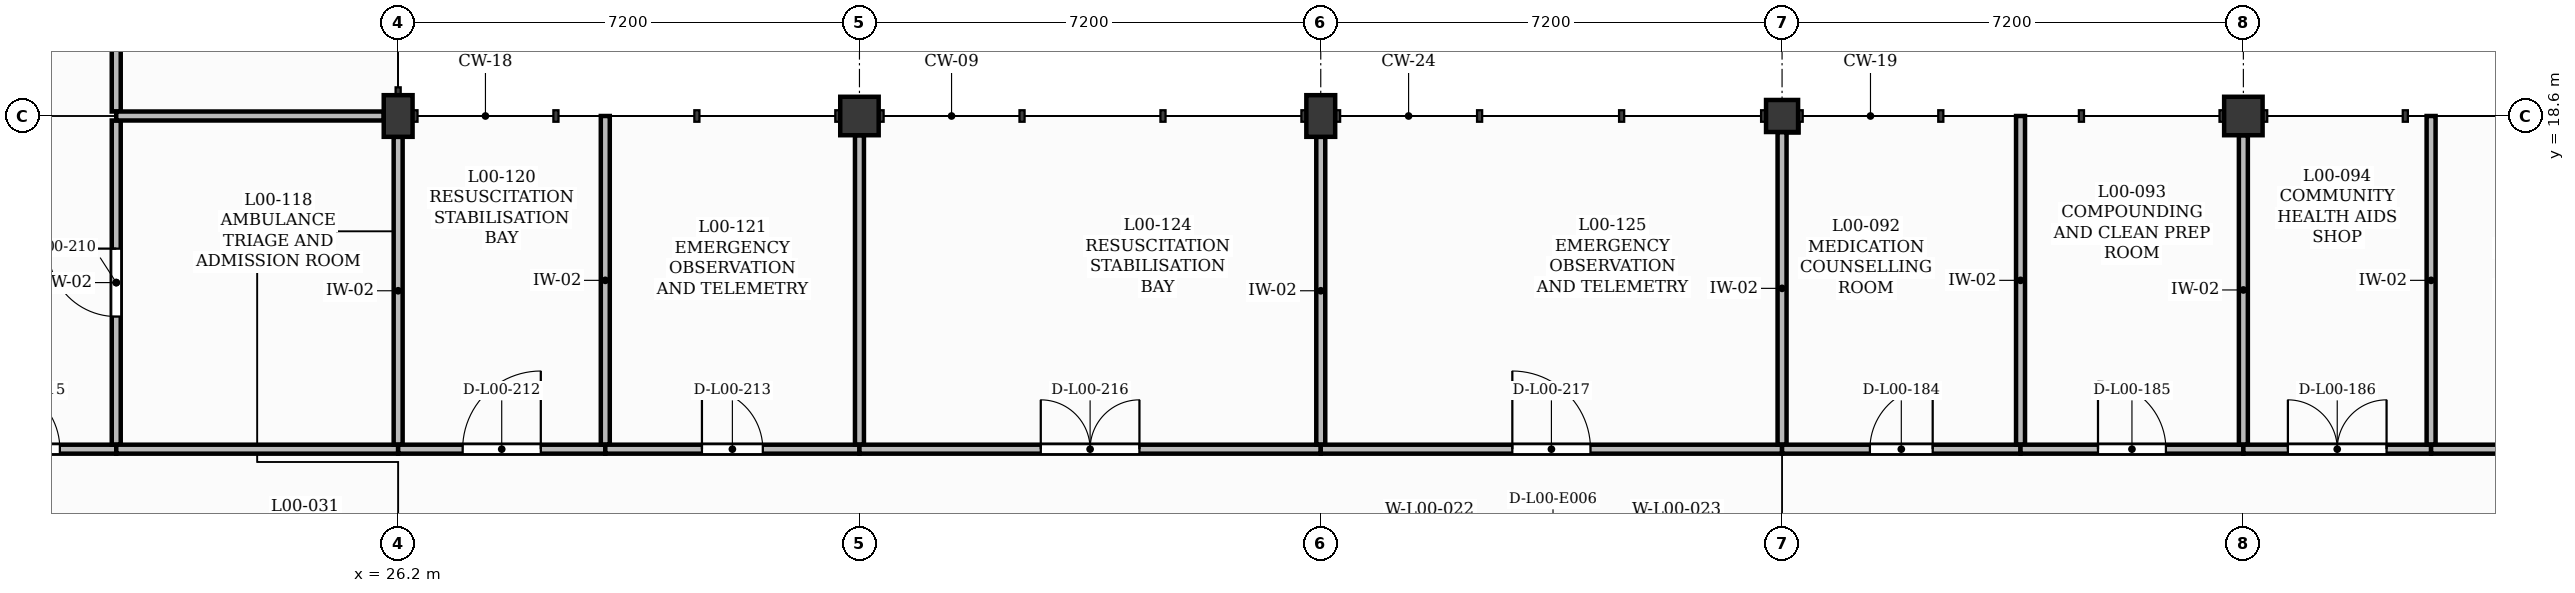
"""IFC4 building model, lengths in metres.
Left out: names, types, materials, properties, quantities, classifications, styles, units other than length and angle.
Written with IfcOpenShell. Run it as: python <this file> out.ifc"""

import sys

from ifc_helpers import new_model, si_unit, direction, frame, frame_2d, origin, origin_2d, place, context, subcontext, project, spatial, rectangle, extrude, element, fill, save


model = new_model("IFC4")
c1 = context("Model", 3, precision=1e-05, world=origin(), true_north=direction((0.0, 1.0)))
c2 = subcontext(c1, "Body", "Model", "MODEL_VIEW")
j1 = project(units=[si_unit("LENGTHUNIT", "METRE"), si_unit("PLANEANGLEUNIT", "RADIAN")], contexts=[c1])
p1 = place(None, origin())
s1 = spatial("IfcSite", under=j1, at=p1, CompositionType="ELEMENT")
p2 = place(p1, origin())
s2 = spatial("IfcBuilding", under=s1, at=p2, CompositionType="ELEMENT")
p3 = place(p2, origin())
s3 = spatial("IfcBuildingStorey", under=s2, at=p3, CompositionType="ELEMENT", Elevation=0.0)
p4 = place(p3, frame((26.2, 18.6, 0.0), z_axis=(0.0, 0.0, 1.0), x_axis=(1.0, 0.0, 0.0)))
e1 = element("IfcColumn", 1, at=p4, inside=s3, PredefinedType="COLUMN", context=c2, shape_type="SweptSolid", body=[
    extrude(rectangle(XDim=0.45, YDim=0.65, at=origin_2d()), origin(), (0.0, 0.0, 1.0), 4.2),
])
p5 = place(p3, frame((33.4, 18.6, 0.0), z_axis=(0.0, 0.0, 1.0), x_axis=(1.0, 0.0, 0.0)))
e2 = element("IfcColumn", 2, at=p5, inside=s3, PredefinedType="COLUMN", context=c2, shape_type="SweptSolid", body=[
    extrude(rectangle(XDim=0.6, YDim=0.6, at=origin_2d()), origin(), (0.0, 0.0, 1.0), 4.2),
])
p6 = place(p3, frame((40.6, 18.6, 0.0), z_axis=(0.0, 0.0, 1.0), x_axis=(1.0, 0.0, 0.0)))
e3 = element("IfcColumn", 3, at=p6, inside=s3, PredefinedType="COLUMN", context=c2, shape_type="SweptSolid", body=[
    extrude(rectangle(XDim=0.45, YDim=0.65, at=origin_2d()), origin(), (0.0, 0.0, 1.0), 4.2),
])
p7 = place(p3, frame((47.8, 18.6, 0.0), z_axis=(0.0, 0.0, 1.0), x_axis=(1.0, 0.0, 0.0)))
e4 = element("IfcColumn", 4, at=p7, inside=s3, PredefinedType="COLUMN", context=c2, shape_type="SweptSolid", body=[
    extrude(rectangle(XDim=0.5, YDim=0.5, at=origin_2d()), origin(), (0.0, 0.0, 1.0), 4.2),
])
p8 = place(p3, frame((55.0, 18.6, 0.0), z_axis=(0.0, 0.0, 1.0), x_axis=(1.0, 0.0, 0.0)))
e5 = element("IfcColumn", 5, at=p8, inside=s3, PredefinedType="COLUMN", context=c2, shape_type="SweptSolid", body=[
    extrude(rectangle(XDim=0.6, YDim=0.6, at=origin_2d()), origin(), (0.0, 0.0, 1.0), 4.2),
])
p9 = place(p3, frame((19.0, 13.4, 0.0), z_axis=(0.0, 0.0, 1.0), x_axis=(1.0, 0.0, 0.0)))
e6 = element("IfcWall", 6, at=p9, inside=s3, PredefinedType="PARTITIONING", context=c2, shape_type="SweptSolid", body=[
    extrude(rectangle(XDim=2.8, YDim=0.14, at=frame_2d((1.4, 0.0))), origin(), (0.0, 0.0, 1.0), 4.18),
])
p10 = place(p9, frame((0.88, 0.0, 0.0)))
e7 = element("IfcOpeningElement", 7, at=p10, cuts=e6, PredefinedType="OPENING", context=c2, shape_type="SweptSolid", body=[
    extrude(rectangle(XDim=1.04, YDim=2.1, at=frame_2d((0.52, 1.05))), frame((0.0, 0.08, 0.0), z_axis=(0.0, -1.0, 0.0), x_axis=(1.0, 0.0, 0.0)), (0.0, 0.0, 1.0), 0.16),
])
p11 = place(p3, frame((21.8, 13.47, 0.0), z_axis=(0.0, 0.0, 1.0), x_axis=(0.0, 1.0, 0.0)))
e8 = element("IfcWall", 8, at=p11, inside=s3, PredefinedType="PARTITIONING", context=c2, shape_type="SweptSolid", body=[
    extrude(rectangle(XDim=5.06, YDim=0.14, at=frame_2d((2.53, 0.0))), origin(), (0.0, 0.0, 1.0), 4.18),
])
p12 = place(p11, frame((2.0, 0.0, 0.0)))
e9 = element("IfcOpeningElement", 9, at=p12, cuts=e8, PredefinedType="OPENING", context=c2, shape_type="SweptSolid", body=[
    extrude(rectangle(XDim=1.06, YDim=2.15, at=frame_2d((0.53, 1.075))), frame((0.0, 0.08, 0.0), z_axis=(0.0, -1.0, 0.0), x_axis=(1.0, 0.0, 0.0)), (0.0, 0.0, 1.0), 0.16),
])
p13 = place(p3, frame((21.8, 13.4, 0.0), z_axis=(0.0, 0.0, 1.0), x_axis=(1.0, 0.0, 0.0)))
e10 = element("IfcWall", 10, at=p13, inside=s3, PredefinedType="PARTITIONING", context=c2, shape_type="SweptSolid", body=[
    extrude(rectangle(XDim=4.4, YDim=0.14, at=frame_2d((2.2, 0.0))), origin(), (0.0, 0.0, 1.0), 4.18),
])
p14 = place(p3, frame((21.8, 18.67, 0.0), z_axis=(0.0, 0.0, 1.0), x_axis=(0.0, 1.0, 0.0)))
e11 = element("IfcWall", 11, at=p14, inside=s3, PredefinedType="PARTITIONING", context=c2, shape_type="SweptSolid", body=[
    extrude(rectangle(XDim=8.46, YDim=0.14, at=frame_2d((4.23, 0.0))), origin(), (0.0, 0.0, 1.0), 4.18),
])
p15 = place(p14, frame((3.46, 0.0, 0.0)))
e12 = element("IfcOpeningElement", 12, at=p15, cuts=e11, PredefinedType="OPENING", context=c2, shape_type="SweptSolid", body=[
    extrude(rectangle(XDim=1.54, YDim=2.25, at=frame_2d((0.77, 1.125))), frame((0.0, 0.08, 0.0), z_axis=(0.0, -1.0, 0.0), x_axis=(1.0, 0.0, 0.0)), (0.0, 0.0, 1.0), 0.16),
])
p16 = place(p3, frame((21.8, 18.6, 0.0), z_axis=(0.0, 0.0, 1.0), x_axis=(1.0, 0.0, 0.0)))
e13 = element("IfcWall", 13, at=p16, inside=s3, PredefinedType="PARTITIONING", context=c2, shape_type="SweptSolid", body=[
    extrude(rectangle(XDim=4.175, YDim=0.14, at=frame_2d((2.087, 0.0))), origin(), (0.0, 0.0, 1.0), 3.25),
])
p17 = place(p3, frame((26.2, 13.47, 0.0), z_axis=(0.0, 0.0, 1.0), x_axis=(0.0, 1.0, 0.0)))
e14 = element("IfcWall", 14, at=p17, inside=s3, PredefinedType="PARTITIONING", context=c2, shape_type="SweptSolid", body=[
    extrude(rectangle(XDim=4.805, YDim=0.14, at=frame_2d((2.402, 0.0))), origin(), (0.0, 0.0, 1.0), 3.5),
])
p18 = place(p3, frame((26.2, 13.4, 0.0), z_axis=(0.0, 0.0, 1.0), x_axis=(1.0, 0.0, 0.0)))
e15 = element("IfcWall", 15, at=p18, inside=s3, PredefinedType="PARTITIONING", context=c2, shape_type="SweptSolid", body=[
    extrude(rectangle(XDim=3.233, YDim=0.14, at=frame_2d((1.617, 0.0))), origin(), (0.0, 0.0, 1.0), 4.18),
])
p19 = place(p18, frame((1.007, 0.0, 0.0)))
e16 = element("IfcOpeningElement", 16, at=p19, cuts=e15, PredefinedType="OPENING", context=c2, shape_type="SweptSolid", body=[
    extrude(rectangle(XDim=1.22, YDim=2.1, at=frame_2d((0.61, 1.05))), frame((0.0, 0.08, 0.0), z_axis=(0.0, -1.0, 0.0), x_axis=(1.0, 0.0, 0.0)), (0.0, 0.0, 1.0), 0.16),
])
p20 = place(p3, frame((29.433, 13.47, 0.0), z_axis=(0.0, 0.0, 1.0), x_axis=(0.0, 1.0, 0.0)))
e17 = element("IfcWall", 17, at=p20, inside=s3, PredefinedType="PARTITIONING", context=c2, shape_type="SweptSolid", body=[
    extrude(rectangle(XDim=5.13, YDim=0.14, at=frame_2d((2.565, 0.0))), origin(), (0.0, 0.0, 1.0), 4.18),
])
p21 = place(p3, frame((29.433, 13.4, 0.0), z_axis=(0.0, 0.0, 1.0), x_axis=(1.0, 0.0, 0.0)))
e18 = element("IfcWall", 18, at=p21, inside=s3, PredefinedType="PARTITIONING", context=c2, shape_type="SweptSolid", body=[
    extrude(rectangle(XDim=3.967, YDim=0.14, at=frame_2d((1.983, 0.0))), origin(), (0.0, 0.0, 1.0), 4.18),
])
p22 = place(p21, frame((1.509, 0.0, 0.0)))
e19 = element("IfcOpeningElement", 19, at=p22, cuts=e18, PredefinedType="OPENING", context=c2, shape_type="SweptSolid", body=[
    extrude(rectangle(XDim=0.95, YDim=2.1, at=frame_2d((0.475, 1.05))), frame((0.0, 0.08, 0.0), z_axis=(0.0, -1.0, 0.0), x_axis=(1.0, 0.0, 0.0)), (0.0, 0.0, 1.0), 0.16),
])
p23 = place(p3, frame((33.4, 13.47, 0.0), z_axis=(0.0, 0.0, 1.0), x_axis=(0.0, 1.0, 0.0)))
e20 = element("IfcWall", 20, at=p23, inside=s3, PredefinedType="PARTITIONING", context=c2, shape_type="SweptSolid", body=[
    extrude(rectangle(XDim=4.83, YDim=0.14, at=frame_2d((2.415, 0.0))), origin(), (0.0, 0.0, 1.0), 3.5),
])
p24 = place(p3, frame((33.4, 13.4, 0.0), z_axis=(0.0, 0.0, 1.0), x_axis=(1.0, 0.0, 0.0)))
e21 = element("IfcWall", 21, at=p24, inside=s3, PredefinedType="PARTITIONING", context=c2, shape_type="SweptSolid", body=[
    extrude(rectangle(XDim=7.2, YDim=0.14, at=frame_2d((3.6, 0.0))), origin(), (0.0, 0.0, 1.0), 4.18),
])
p25 = place(p24, frame((2.83, 0.0, 0.0)))
e22 = element("IfcOpeningElement", 22, at=p25, cuts=e21, PredefinedType="OPENING", context=c2, shape_type="SweptSolid", body=[
    extrude(rectangle(XDim=1.54, YDim=2.25, at=frame_2d((0.77, 1.125))), frame((0.0, 0.08, 0.0), z_axis=(0.0, -1.0, 0.0), x_axis=(1.0, 0.0, 0.0)), (0.0, 0.0, 1.0), 0.16),
])
p26 = place(p3, frame((40.6, 13.47, 0.0), z_axis=(0.0, 0.0, 1.0), x_axis=(0.0, 1.0, 0.0)))
e23 = element("IfcWall", 23, at=p26, inside=s3, PredefinedType="PARTITIONING", context=c2, shape_type="SweptSolid", body=[
    extrude(rectangle(XDim=4.805, YDim=0.14, at=frame_2d((2.402, 0.0))), origin(), (0.0, 0.0, 1.0), 3.5),
])
p27 = place(p3, frame((40.6, 13.4, 0.0), z_axis=(0.0, 0.0, 1.0), x_axis=(1.0, 0.0, 0.0)))
e24 = element("IfcWall", 24, at=p27, inside=s3, PredefinedType="PARTITIONING", context=c2, shape_type="SweptSolid", body=[
    extrude(rectangle(XDim=7.2, YDim=0.14, at=frame_2d((3.6, 0.0))), origin(), (0.0, 0.0, 1.0), 4.18),
])
p28 = place(p27, frame((2.99, 0.0, 0.0)))
e25 = element("IfcOpeningElement", 25, at=p28, cuts=e24, PredefinedType="OPENING", context=c2, shape_type="SweptSolid", body=[
    extrude(rectangle(XDim=1.22, YDim=2.1, at=frame_2d((0.61, 1.05))), frame((0.0, 0.08, 0.0), z_axis=(0.0, -1.0, 0.0), x_axis=(1.0, 0.0, 0.0)), (0.0, 0.0, 1.0), 0.16),
])
p29 = place(p3, frame((47.8, 13.47, 0.0), z_axis=(0.0, 0.0, 1.0), x_axis=(0.0, 1.0, 0.0)))
e26 = element("IfcWall", 26, at=p29, inside=s3, PredefinedType="PARTITIONING", context=c2, shape_type="SweptSolid", body=[
    extrude(rectangle(XDim=4.88, YDim=0.14, at=frame_2d((2.44, 0.0))), origin(), (0.0, 0.0, 1.0), 3.5),
])
p30 = place(p3, frame((47.8, 13.4, 0.0), z_axis=(0.0, 0.0, 1.0), x_axis=(1.0, 0.0, 0.0)))
e27 = element("IfcWall", 27, at=p30, inside=s3, PredefinedType="PARTITIONING", context=c2, shape_type="SweptSolid", body=[
    extrude(rectangle(XDim=3.722, YDim=0.14, at=frame_2d((1.861, 0.0))), origin(), (0.0, 0.0, 1.0), 4.18),
])
p31 = place(p30, frame((1.371, 0.0, 0.0)))
e28 = element("IfcOpeningElement", 28, at=p31, cuts=e27, PredefinedType="OPENING", context=c2, shape_type="SweptSolid", body=[
    extrude(rectangle(XDim=0.98, YDim=2.15, at=frame_2d((0.49, 1.075))), frame((0.0, 0.08, 0.0), z_axis=(0.0, -1.0, 0.0), x_axis=(1.0, 0.0, 0.0)), (0.0, 0.0, 1.0), 0.16),
])
p32 = place(p3, frame((51.522, 13.47, 0.0), z_axis=(0.0, 0.0, 1.0), x_axis=(0.0, 1.0, 0.0)))
e29 = element("IfcWall", 29, at=p32, inside=s3, PredefinedType="PARTITIONING", context=c2, shape_type="SweptSolid", body=[
    extrude(rectangle(XDim=5.13, YDim=0.14, at=frame_2d((2.565, 0.0))), origin(), (0.0, 0.0, 1.0), 4.18),
])
p33 = place(p3, frame((51.522, 13.4, 0.0), z_axis=(0.0, 0.0, 1.0), x_axis=(1.0, 0.0, 0.0)))
e30 = element("IfcWall", 30, at=p33, inside=s3, PredefinedType="PARTITIONING", context=c2, shape_type="SweptSolid", body=[
    extrude(rectangle(XDim=3.478, YDim=0.14, at=frame_2d((1.739, 0.0))), origin(), (0.0, 0.0, 1.0), 4.18),
])
p34 = place(p33, frame((1.209, 0.0, 0.0)))
e31 = element("IfcOpeningElement", 31, at=p34, cuts=e30, PredefinedType="OPENING", context=c2, shape_type="SweptSolid", body=[
    extrude(rectangle(XDim=1.06, YDim=2.15, at=frame_2d((0.53, 1.075))), frame((0.0, 0.08, 0.0), z_axis=(0.0, -1.0, 0.0), x_axis=(1.0, 0.0, 0.0)), (0.0, 0.0, 1.0), 0.16),
])
p35 = place(p3, frame((55.0, 13.47, 0.0), z_axis=(0.0, 0.0, 1.0), x_axis=(0.0, 1.0, 0.0)))
e32 = element("IfcWall", 32, at=p35, inside=s3, PredefinedType="PARTITIONING", context=c2, shape_type="SweptSolid", body=[
    extrude(rectangle(XDim=4.83, YDim=0.14, at=frame_2d((2.415, 0.0))), origin(), (0.0, 0.0, 1.0), 3.5),
])
p36 = place(p3, frame((55.0, 13.4, 0.0), z_axis=(0.0, 0.0, 1.0), x_axis=(1.0, 0.0, 0.0)))
e33 = element("IfcWall", 33, at=p36, inside=s3, PredefinedType="PARTITIONING", context=c2, shape_type="SweptSolid", body=[
    extrude(rectangle(XDim=2.93, YDim=0.14, at=frame_2d((1.465, 0.0))), origin(), (0.0, 0.0, 1.0), 4.18),
])
p37 = place(p36, frame((0.695, 0.0, 0.0)))
e34 = element("IfcOpeningElement", 34, at=p37, cuts=e33, PredefinedType="OPENING", context=c2, shape_type="SweptSolid", body=[
    extrude(rectangle(XDim=1.54, YDim=2.25, at=frame_2d((0.77, 1.125))), frame((0.0, 0.08, 0.0), z_axis=(0.0, -1.0, 0.0), x_axis=(1.0, 0.0, 0.0)), (0.0, 0.0, 1.0), 0.16),
])
p38 = place(p3, frame((57.93, 13.47, 0.0), z_axis=(0.0, 0.0, 1.0), x_axis=(0.0, 1.0, 0.0)))
e35 = element("IfcWall", 35, at=p38, inside=s3, PredefinedType="PARTITIONING", context=c2, shape_type="SweptSolid", body=[
    extrude(rectangle(XDim=5.13, YDim=0.14, at=frame_2d((2.565, 0.0))), origin(), (0.0, 0.0, 1.0), 4.18),
])
p39 = place(p3, frame((57.93, 13.4, 0.0), z_axis=(0.0, 0.0, 1.0), x_axis=(1.0, 0.0, 0.0)))
e36 = element("IfcWall", 36, at=p39, inside=s3, PredefinedType="PARTITIONING", context=c2, shape_type="SweptSolid", body=[
    extrude(rectangle(XDim=4.27, YDim=0.14, at=frame_2d((2.135, 0.0))), origin(), (0.0, 0.0, 1.0), 4.18),
])
p40 = place(p39, frame((1.525, 0.0, 0.0)))
e37 = element("IfcOpeningElement", 37, at=p40, cuts=e36, PredefinedType="OPENING", context=c2, shape_type="SweptSolid", body=[
    extrude(rectangle(XDim=1.22, YDim=2.1, at=frame_2d((0.61, 1.05))), frame((0.0, 0.08, 0.0), z_axis=(0.0, -1.0, 0.0), x_axis=(1.0, 0.0, 0.0)), (0.0, 0.0, 1.0), 0.16),
])
p41 = place(p10, origin())
e38 = element("IfcDoor", 38, at=p41, inside=s3, OperationType="SINGLE_SWING_LEFT", PredefinedType="DOOR", context=c2, shape_type="SweptSolid", body=[
    extrude(rectangle(XDim=1.04, YDim=2.1, at=frame_2d((0.52, 1.05))), frame((0.0, 0.025, 0.0), z_axis=(0.0, -1.0, 0.0), x_axis=(1.0, 0.0, 0.0)), (0.0, 0.0, 1.0), 0.05),
])
fill(e7, e38)
p42 = place(p31, origin())
e39 = element("IfcDoor", 39, at=p42, inside=s3, OperationType="SINGLE_SWING_RIGHT", PredefinedType="DOOR", context=c2, shape_type="SweptSolid", body=[
    extrude(rectangle(XDim=0.98, YDim=2.15, at=frame_2d((0.49, 1.075))), frame((0.0, 0.025, 0.0), z_axis=(0.0, -1.0, 0.0), x_axis=(1.0, 0.0, 0.0)), (0.0, 0.0, 1.0), 0.05),
])
fill(e28, e39)
p43 = place(p34, origin())
e40 = element("IfcDoor", 40, at=p43, inside=s3, OperationType="SINGLE_SWING_LEFT", PredefinedType="DOOR", context=c2, shape_type="SweptSolid", body=[
    extrude(rectangle(XDim=1.06, YDim=2.15, at=frame_2d((0.53, 1.075))), frame((0.0, 0.025, 0.0), z_axis=(0.0, -1.0, 0.0), x_axis=(1.0, 0.0, 0.0)), (0.0, 0.0, 1.0), 0.05),
])
fill(e31, e40)
p44 = place(p37, origin())
e41 = element("IfcDoor", 41, at=p44, inside=s3, OperationType="DOUBLE_DOOR_SINGLE_SWING", PredefinedType="DOOR", context=c2, shape_type="SweptSolid", body=[
    extrude(rectangle(XDim=1.54, YDim=2.25, at=frame_2d((0.77, 1.125))), frame((0.0, 0.025, 0.0), z_axis=(0.0, -1.0, 0.0), x_axis=(1.0, 0.0, 0.0)), (0.0, 0.0, 1.0), 0.05),
])
fill(e34, e41)
p45 = place(p12, origin())
e42 = element("IfcDoor", 42, at=p45, inside=s3, OperationType="SINGLE_SWING_RIGHT", PredefinedType="DOOR", context=c2, shape_type="SweptSolid", body=[
    extrude(rectangle(XDim=1.06, YDim=2.15, at=frame_2d((0.53, 1.075))), frame((0.0, 0.025, 0.0), z_axis=(0.0, -1.0, 0.0), x_axis=(1.0, 0.0, 0.0)), (0.0, 0.0, 1.0), 0.05),
])
fill(e9, e42)
p46 = place(p19, origin())
e43 = element("IfcDoor", 43, at=p46, inside=s3, OperationType="SINGLE_SWING_RIGHT", PredefinedType="DOOR", context=c2, shape_type="SweptSolid", body=[
    extrude(rectangle(XDim=1.22, YDim=2.1, at=frame_2d((0.61, 1.05))), frame((0.0, 0.025, 0.0), z_axis=(0.0, -1.0, 0.0), x_axis=(1.0, 0.0, 0.0)), (0.0, 0.0, 1.0), 0.05),
])
fill(e16, e43)
p47 = place(p22, origin())
e44 = element("IfcDoor", 44, at=p47, inside=s3, OperationType="SINGLE_SWING_LEFT", PredefinedType="DOOR", context=c2, shape_type="SweptSolid", body=[
    extrude(rectangle(XDim=0.95, YDim=2.1, at=frame_2d((0.475, 1.05))), frame((0.0, 0.025, 0.0), z_axis=(0.0, -1.0, 0.0), x_axis=(1.0, 0.0, 0.0)), (0.0, 0.0, 1.0), 0.05),
])
fill(e19, e44)
p48 = place(p25, origin())
e45 = element("IfcDoor", 45, at=p48, inside=s3, OperationType="DOUBLE_DOOR_SINGLE_SWING", PredefinedType="DOOR", context=c2, shape_type="SweptSolid", body=[
    extrude(rectangle(XDim=1.54, YDim=2.25, at=frame_2d((0.77, 1.125))), frame((0.0, 0.025, 0.0), z_axis=(0.0, -1.0, 0.0), x_axis=(1.0, 0.0, 0.0)), (0.0, 0.0, 1.0), 0.05),
])
fill(e22, e45)
p49 = place(p28, origin())
e46 = element("IfcDoor", 46, at=p49, inside=s3, OperationType="SINGLE_SWING_LEFT", PredefinedType="DOOR", context=c2, shape_type="SweptSolid", body=[
    extrude(rectangle(XDim=1.22, YDim=2.1, at=frame_2d((0.61, 1.05))), frame((0.0, 0.025, 0.0), z_axis=(0.0, -1.0, 0.0), x_axis=(1.0, 0.0, 0.0)), (0.0, 0.0, 1.0), 0.05),
])
fill(e25, e46)
save(model, sys.argv[1])
